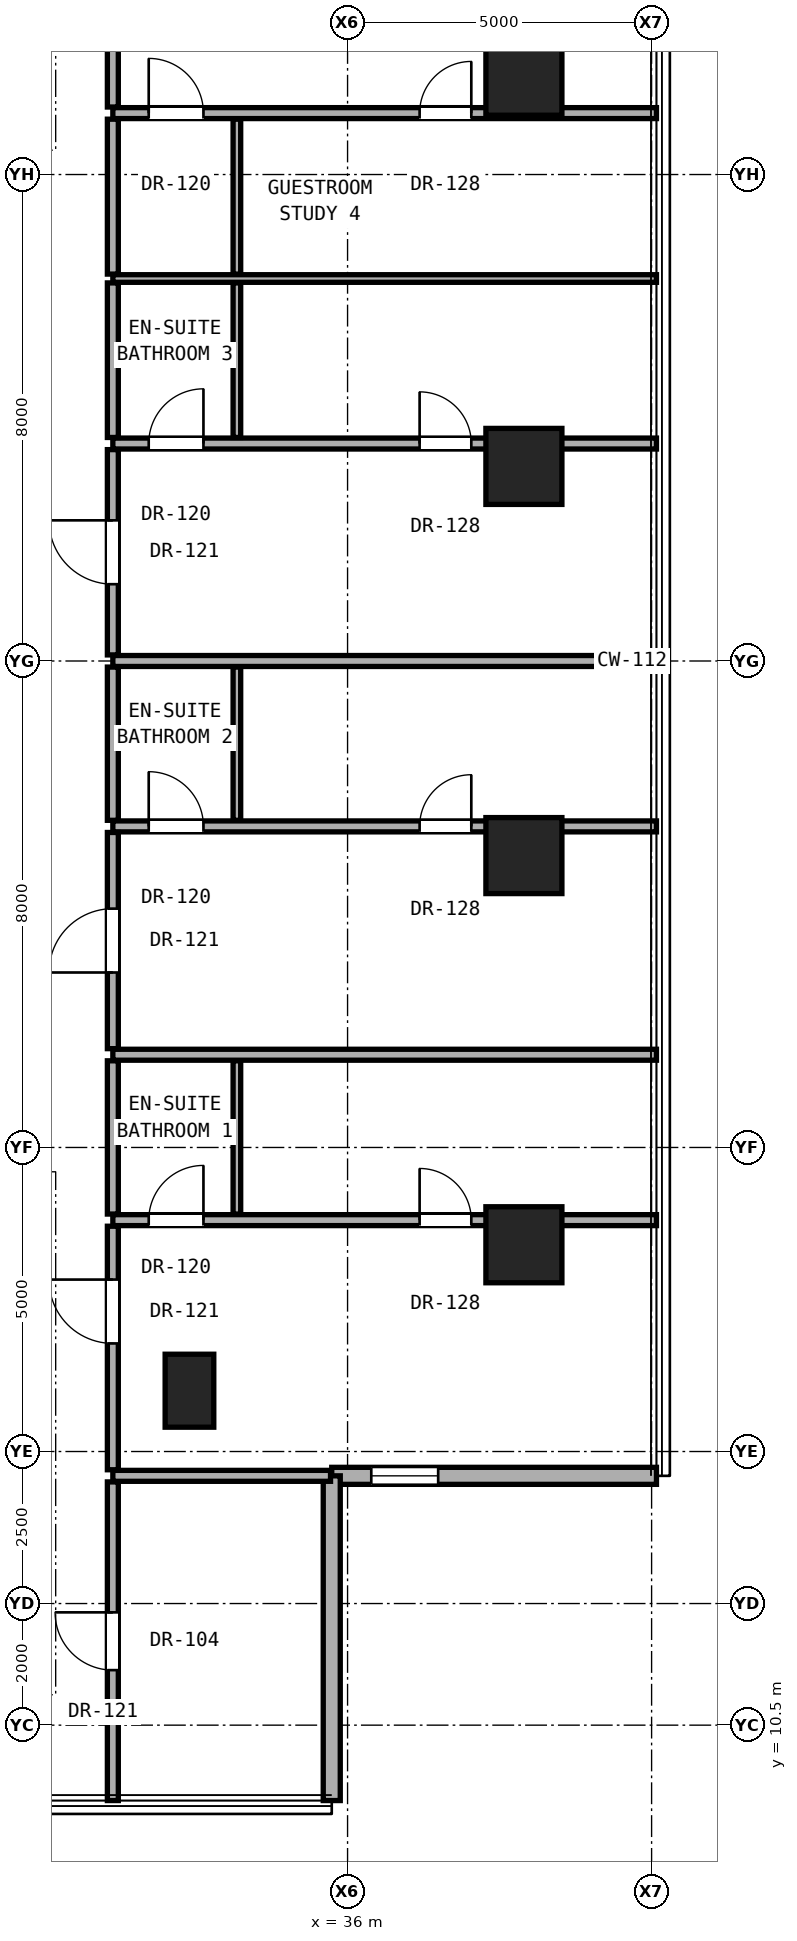
"""IFC4 building model, lengths in metres.
Left out: names, types, materials, properties, quantities, classifications, styles, units other than length and angle.
Written with IfcOpenShell. Run it as: python <this file> out.ifc"""

import sys

from ifc_helpers import new_model, si_unit, direction, frame, frame_2d, origin, origin_2d, place, context, subcontext, project, spatial, rectangle, hollow_rectangle, extrude, element, fill, save


model = new_model("IFC4")
c1 = context("Model", 3, precision=1e-05, world=origin(), true_north=direction((0.0, 1.0)))
c2 = subcontext(c1, "Body", "Model", "MODEL_VIEW")
j1 = project(units=[si_unit("LENGTHUNIT", "METRE"), si_unit("PLANEANGLEUNIT", "RADIAN")], contexts=[c1])
p1 = place(None, origin())
s1 = spatial("IfcSite", under=j1, at=p1, CompositionType="ELEMENT")
p2 = place(p1, origin())
s2 = spatial("IfcBuilding", under=s1, at=p2, CompositionType="ELEMENT")
p3 = place(p2, frame((0.0, 0.0, 52.1)))
s3 = spatial("IfcBuildingStorey", under=s2, at=p3, CompositionType="ELEMENT", Elevation=52.1)
for number, where, z_axis, x_axis in (
    (1, (38.9, 18.4, 0.0), (0.0, 0.0, 1.0), (1.0, 0.0, 0.0)),
    (2, (38.9, 24.8, 0.0), (0.0, 0.0, 1.0), (1.0, 0.0, 0.0)),
    (3, (38.9, 31.2, 0.0), (0.0, 0.0, 1.0), (1.0, 0.0, 0.0)),
    (4, (38.9, 37.6, 0.0), (0.0, 0.0, 1.0), (1.0, 0.0, 0.0)),
):
    element("IfcColumn", number, at=place(p3, frame(where, z_axis=z_axis, x_axis=x_axis)), inside=s3, PredefinedType="COLUMN", context=c2, shape_type="SweptSolid", body=[
        extrude(hollow_rectangle(XDim=1.25, YDim=1.25, WallThickness=0.07, at=origin_2d()), origin(), (0.0, 0.0, 1.0), 3.3),
    ])
p4 = place(p3, frame((33.4, 16.0, 0.0), z_axis=(0.0, 0.0, 1.0), x_axis=(1.0, 0.0, 0.0)))
e5 = element("IfcColumn", 5, at=p4, inside=s3, PredefinedType="PILASTER", context=c2, shape_type="SweptSolid", body=[
    extrude(rectangle(XDim=0.8, YDim=1.2, at=origin_2d()), origin(), (0.0, 0.0, 1.0), 3.3),
])
p5 = place(p3, frame((35.74, 14.6, 0.0), z_axis=(0.0, 0.0, 1.0), x_axis=(1.0, 0.0, 0.0)))
e6 = element("IfcWall", 6, at=p5, inside=s3, PredefinedType="SOLIDWALL", context=c2, shape_type="SweptSolid", body=[
    extrude(rectangle(XDim=5.34, YDim=0.28, at=frame_2d((2.67, 0.0))), origin(), (0.0, 0.0, 1.0), 3.04),
])
p6 = place(p5, frame((0.65, 0.0, 0.85)))
e7 = element("IfcOpeningElement", 7, at=p6, cuts=e6, PredefinedType="OPENING", context=c2, shape_type="SweptSolid", body=[
    extrude(rectangle(XDim=1.1, YDim=2.0, at=frame_2d((0.55, 1.0))), frame((0.0, 0.15, 0.0), z_axis=(0.0, -1.0, 0.0), x_axis=(1.0, 0.0, 0.0)), (0.0, 0.0, 1.0), 0.3),
])
p7 = place(p3, frame((35.74, 9.26, 0.0), z_axis=(0.0, 0.0, 1.0), x_axis=(0.0, 1.0, 0.0)))
e8 = element("IfcWall", 8, at=p7, inside=s3, PredefinedType="SOLIDWALL", context=c2, shape_type="SweptSolid", body=[
    extrude(rectangle(XDim=5.34, YDim=0.28, at=frame_2d((2.67, 0.0))), origin(), (0.0, 0.0, 1.0), 3.04),
])
p8 = place(p3, frame((32.14, 14.6, 0.0), z_axis=(0.0, 0.0, 1.0), x_axis=(1.0, 0.0, 0.0)))
e9 = element("IfcWall", 9, at=p8, inside=s3, PredefinedType="PARTITIONING", context=c2, shape_type="SweptSolid", body=[
    extrude(rectangle(XDim=3.58, YDim=0.18, at=frame_2d((1.79, 0.0))), origin(), (0.0, 0.0, 1.0), 3.06),
])
p9 = place(p3, frame((32.14, 18.805, 0.0), z_axis=(0.0, 0.0, 1.0), x_axis=(1.0, 0.0, 0.0)))
e10 = element("IfcWall", 10, at=p9, inside=s3, PredefinedType="PARTITIONING", context=c2, shape_type="SweptSolid", body=[
    extrude(rectangle(XDim=8.94, YDim=0.18, at=frame_2d((4.47, 0.0))), origin(), (0.0, 0.0, 1.0), 2.125),
])
p10 = place(p9, frame((5.045, 0.0, 0.0)))
e11 = element("IfcOpeningElement", 11, at=p10, cuts=e10, PredefinedType="OPENING", context=c2, shape_type="SweptSolid", body=[
    extrude(rectangle(XDim=0.85, YDim=2.01, at=frame_2d((0.425, 1.005))), frame((0.0, 0.1, 0.0), z_axis=(0.0, -1.0, 0.0), x_axis=(1.0, 0.0, 0.0)), (0.0, 0.0, 1.0), 0.2),
])
p11 = place(p9, frame((0.59, 0.0, 0.0)))
e12 = element("IfcOpeningElement", 12, at=p11, cuts=e10, PredefinedType="OPENING", context=c2, shape_type="SweptSolid", body=[
    extrude(rectangle(XDim=0.9, YDim=2.1, at=frame_2d((0.45, 1.05))), frame((0.0, 0.1, 0.0), z_axis=(0.0, -1.0, 0.0), x_axis=(1.0, 0.0, 0.0)), (0.0, 0.0, 1.0), 0.2),
])
p12 = place(p3, frame((32.14, 21.525, 0.0), z_axis=(0.0, 0.0, 1.0), x_axis=(1.0, 0.0, 0.0)))
e13 = element("IfcWall", 13, at=p12, inside=s3, PredefinedType="PARTITIONING", context=c2, shape_type="SweptSolid", body=[
    extrude(rectangle(XDim=8.94, YDim=0.18, at=frame_2d((4.47, 0.0))), origin(), (0.0, 0.0, 1.0), 2.125),
])
p13 = place(p3, frame((32.14, 25.28, 0.0), z_axis=(0.0, 0.0, 1.0), x_axis=(1.0, 0.0, 0.0)))
e14 = element("IfcWall", 14, at=p13, inside=s3, PredefinedType="PARTITIONING", context=c2, shape_type="SweptSolid", body=[
    extrude(rectangle(XDim=8.94, YDim=0.18, at=frame_2d((4.47, 0.0))), origin(), (0.0, 0.0, 1.0), 2.125),
])
p14 = place(p13, frame((5.045, 0.0, 0.0)))
e15 = element("IfcOpeningElement", 15, at=p14, cuts=e14, PredefinedType="OPENING", context=c2, shape_type="SweptSolid", body=[
    extrude(rectangle(XDim=0.85, YDim=2.01, at=frame_2d((0.425, 1.005))), frame((0.0, 0.1, 0.0), z_axis=(0.0, -1.0, 0.0), x_axis=(1.0, 0.0, 0.0)), (0.0, 0.0, 1.0), 0.2),
])
p15 = place(p13, frame((0.59, 0.0, 0.0)))
e16 = element("IfcOpeningElement", 16, at=p15, cuts=e14, PredefinedType="OPENING", context=c2, shape_type="SweptSolid", body=[
    extrude(rectangle(XDim=0.9, YDim=2.1, at=frame_2d((0.45, 1.05))), frame((0.0, 0.1, 0.0), z_axis=(0.0, -1.0, 0.0), x_axis=(1.0, 0.0, 0.0)), (0.0, 0.0, 1.0), 0.2),
])
p16 = place(p3, frame((32.14, 28.0, 0.0), z_axis=(0.0, 0.0, 1.0), x_axis=(1.0, 0.0, 0.0)))
e17 = element("IfcWall", 17, at=p16, inside=s3, PredefinedType="PARTITIONING", context=c2, shape_type="SweptSolid", body=[
    extrude(rectangle(XDim=8.94, YDim=0.18, at=frame_2d((4.47, 0.0))), origin(), (0.0, 0.0, 1.0), 2.125),
])
p17 = place(p3, frame((32.14, 31.576, 0.0), z_axis=(0.0, 0.0, 1.0), x_axis=(1.0, 0.0, 0.0)))
e18 = element("IfcWall", 18, at=p17, inside=s3, PredefinedType="PARTITIONING", context=c2, shape_type="SweptSolid", body=[
    extrude(rectangle(XDim=8.94, YDim=0.18, at=frame_2d((4.47, 0.0))), origin(), (0.0, 0.0, 1.0), 2.125),
])
p18 = place(p17, frame((5.045, 0.0, 0.0)))
e19 = element("IfcOpeningElement", 19, at=p18, cuts=e18, PredefinedType="OPENING", context=c2, shape_type="SweptSolid", body=[
    extrude(rectangle(XDim=0.85, YDim=2.01, at=frame_2d((0.425, 1.005))), frame((0.0, 0.1, 0.0), z_axis=(0.0, -1.0, 0.0), x_axis=(1.0, 0.0, 0.0)), (0.0, 0.0, 1.0), 0.2),
])
p19 = place(p17, frame((0.59, 0.0, 0.0)))
e20 = element("IfcOpeningElement", 20, at=p19, cuts=e18, PredefinedType="OPENING", context=c2, shape_type="SweptSolid", body=[
    extrude(rectangle(XDim=0.9, YDim=2.1, at=frame_2d((0.45, 1.05))), frame((0.0, 0.1, 0.0), z_axis=(0.0, -1.0, 0.0), x_axis=(1.0, 0.0, 0.0)), (0.0, 0.0, 1.0), 0.2),
])
p20 = place(p3, frame((32.14, 34.29, 0.0), z_axis=(0.0, 0.0, 1.0), x_axis=(1.0, 0.0, 0.0)))
e21 = element("IfcWall", 21, at=p20, inside=s3, PredefinedType="PARTITIONING", context=c2, shape_type="SweptSolid", body=[
    extrude(rectangle(XDim=8.94, YDim=0.125, at=frame_2d((4.47, 0.0))), origin(), (0.0, 0.0, 1.0), 2.125),
])
p21 = place(p3, frame((32.14, 37.01, 0.0), z_axis=(0.0, 0.0, 1.0), x_axis=(1.0, 0.0, 0.0)))
e22 = element("IfcWall", 22, at=p21, inside=s3, PredefinedType="PARTITIONING", context=c2, shape_type="SweptSolid", body=[
    extrude(rectangle(XDim=8.94, YDim=0.18, at=frame_2d((4.47, 0.0))), origin(), (0.0, 0.0, 1.0), 2.125),
])
p22 = place(p21, frame((5.045, 0.0, 0.0)))
e23 = element("IfcOpeningElement", 23, at=p22, cuts=e22, PredefinedType="OPENING", context=c2, shape_type="SweptSolid", body=[
    extrude(rectangle(XDim=0.85, YDim=2.01, at=frame_2d((0.425, 1.005))), frame((0.0, 0.1, 0.0), z_axis=(0.0, -1.0, 0.0), x_axis=(1.0, 0.0, 0.0)), (0.0, 0.0, 1.0), 0.2),
])
p23 = place(p21, frame((0.59, 0.0, 0.0)))
e24 = element("IfcOpeningElement", 24, at=p23, cuts=e22, PredefinedType="OPENING", context=c2, shape_type="SweptSolid", body=[
    extrude(rectangle(XDim=0.9, YDim=2.1, at=frame_2d((0.45, 1.05))), frame((0.0, 0.1, 0.0), z_axis=(0.0, -1.0, 0.0), x_axis=(1.0, 0.0, 0.0)), (0.0, 0.0, 1.0), 0.2),
])
p24 = place(p3, frame((32.14, 9.26, 0.0), z_axis=(0.0, 0.0, 1.0), x_axis=(0.0, 1.0, 0.0)))
e25 = element("IfcWall", 25, at=p24, inside=s3, PredefinedType="PARTITIONING", context=c2, shape_type="SweptSolid", body=[
    extrude(rectangle(XDim=5.24, YDim=0.18, at=frame_2d((2.62, 0.0))), origin(), (0.0, 0.0, 1.0), 3.06),
])
p25 = place(p24, frame((2.145, 0.0, 0.0)))
e26 = element("IfcOpeningElement", 26, at=p25, cuts=e25, PredefinedType="OPENING", context=c2, shape_type="SweptSolid", body=[
    extrude(rectangle(XDim=0.95, YDim=2.15, at=frame_2d((0.475, 1.075))), frame((0.0, 0.1, 0.0), z_axis=(0.0, -1.0, 0.0), x_axis=(1.0, 0.0, 0.0)), (0.0, 0.0, 1.0), 0.2),
])
p26 = place(p3, frame((32.14, 14.7, 0.0), z_axis=(0.0, 0.0, 1.0), x_axis=(0.0, 1.0, 0.0)))
e27 = element("IfcWall", 27, at=p26, inside=s3, PredefinedType="PARTITIONING", context=c2, shape_type="SweptSolid", body=[
    extrude(rectangle(XDim=4.005, YDim=0.18, at=frame_2d((2.002, 0.0))), origin(), (0.0, 0.0, 1.0), 2.436),
])
p27 = place(p26, frame((2.077, 0.0, 0.0)))
e28 = element("IfcOpeningElement", 28, at=p27, cuts=e27, PredefinedType="OPENING", context=c2, shape_type="SweptSolid", body=[
    extrude(rectangle(XDim=1.05, YDim=2.2, at=frame_2d((0.525, 1.1))), frame((0.0, 0.1, 0.0), z_axis=(0.0, -1.0, 0.0), x_axis=(1.0, 0.0, 0.0)), (0.0, 0.0, 1.0), 0.2),
])
p28 = place(p3, frame((32.14, 18.905, 0.0), z_axis=(0.0, 0.0, 1.0), x_axis=(0.0, 1.0, 0.0)))
e29 = element("IfcWall", 29, at=p28, inside=s3, PredefinedType="PARTITIONING", context=c2, shape_type="SweptSolid", body=[
    extrude(rectangle(XDim=2.52, YDim=0.18, at=frame_2d((1.26, 0.0))), origin(), (0.0, 0.0, 1.0), 3.06),
])
p29 = place(p3, frame((32.14, 21.625, 0.0), z_axis=(0.0, 0.0, 1.0), x_axis=(0.0, 1.0, 0.0)))
e30 = element("IfcWall", 30, at=p29, inside=s3, PredefinedType="PARTITIONING", context=c2, shape_type="SweptSolid", body=[
    extrude(rectangle(XDim=3.555, YDim=0.18, at=frame_2d((1.777, 0.0))), origin(), (0.0, 0.0, 1.0), 2.279),
])
p30 = place(p29, frame((1.252, 0.0, 0.0)))
e31 = element("IfcOpeningElement", 31, at=p30, cuts=e30, PredefinedType="OPENING", context=c2, shape_type="SweptSolid", body=[
    extrude(rectangle(XDim=1.05, YDim=2.2, at=frame_2d((0.525, 1.1))), frame((0.0, 0.1, 0.0), z_axis=(0.0, -1.0, 0.0), x_axis=(1.0, 0.0, 0.0)), (0.0, 0.0, 1.0), 0.2),
])
p31 = place(p3, frame((32.14, 25.38, 0.0), z_axis=(0.0, 0.0, 1.0), x_axis=(0.0, 1.0, 0.0)))
e32 = element("IfcWall", 32, at=p31, inside=s3, PredefinedType="PARTITIONING", context=c2, shape_type="SweptSolid", body=[
    extrude(rectangle(XDim=2.52, YDim=0.18, at=frame_2d((1.26, 0.0))), origin(), (0.0, 0.0, 1.0), 3.06),
])
p32 = place(p3, frame((32.14, 28.1, 0.0), z_axis=(0.0, 0.0, 1.0), x_axis=(0.0, 1.0, 0.0)))
e33 = element("IfcWall", 33, at=p32, inside=s3, PredefinedType="PARTITIONING", context=c2, shape_type="SweptSolid", body=[
    extrude(rectangle(XDim=3.376, YDim=0.18, at=frame_2d((1.688, 0.0))), origin(), (0.0, 0.0, 1.0), 2.279),
])
p33 = place(p32, frame((1.163, 0.0, 0.0)))
e34 = element("IfcOpeningElement", 34, at=p33, cuts=e33, PredefinedType="OPENING", context=c2, shape_type="SweptSolid", body=[
    extrude(rectangle(XDim=1.05, YDim=2.2, at=frame_2d((0.525, 1.1))), frame((0.0, 0.1, 0.0), z_axis=(0.0, -1.0, 0.0), x_axis=(1.0, 0.0, 0.0)), (0.0, 0.0, 1.0), 0.2),
])
p34 = place(p3, frame((32.14, 31.676, 0.0), z_axis=(0.0, 0.0, 1.0), x_axis=(0.0, 1.0, 0.0)))
e35 = element("IfcWall", 35, at=p34, inside=s3, PredefinedType="PARTITIONING", context=c2, shape_type="SweptSolid", body=[
    extrude(rectangle(XDim=2.542, YDim=0.18, at=frame_2d((1.271, 0.0))), origin(), (0.0, 0.0, 1.0), 3.06),
])
p35 = place(p3, frame((32.14, 34.363, 0.0), z_axis=(0.0, 0.0, 1.0), x_axis=(0.0, 1.0, 0.0)))
e36 = element("IfcWall", 36, at=p35, inside=s3, PredefinedType="PARTITIONING", context=c2, shape_type="SweptSolid", body=[
    extrude(rectangle(XDim=2.547, YDim=0.18, at=frame_2d((1.274, 0.0))), origin(), (0.0, 0.0, 1.0), 3.06),
])
p36 = place(p3, frame((32.14, 37.11, 0.0), z_axis=(0.0, 0.0, 1.0), x_axis=(0.0, 1.0, 0.0)))
e37 = element("IfcWall", 37, at=p36, inside=s3, PredefinedType="PARTITIONING", context=c2, shape_type="SweptSolid", body=[
    extrude(rectangle(XDim=4.19, YDim=0.18, at=frame_2d((2.095, 0.0))), origin(), (0.0, 0.0, 1.0), 2.436),
])
p37 = place(p36, frame((0.97, 0.0, 0.0)))
e38 = element("IfcOpeningElement", 38, at=p37, cuts=e37, PredefinedType="OPENING", context=c2, shape_type="SweptSolid", body=[
    extrude(rectangle(XDim=1.05, YDim=2.2, at=frame_2d((0.525, 1.1))), frame((0.0, 0.1, 0.0), z_axis=(0.0, -1.0, 0.0), x_axis=(1.0, 0.0, 0.0)), (0.0, 0.0, 1.0), 0.2),
])
for number, where, z_axis, x_axis in (
    (39, (34.18, 18.905, 0.0), (0.0, 0.0, 1.0), (0.0, 1.0, 0.0)),
    (40, (34.18, 25.38, 0.0), (0.0, 0.0, 1.0), (0.0, 1.0, 0.0)),
):
    element("IfcWall", number, at=place(p3, frame(where, z_axis=z_axis, x_axis=x_axis)), inside=s3, PredefinedType="PARTITIONING", context=c2, shape_type="SweptSolid", body=[
        extrude(rectangle(XDim=2.52, YDim=0.125, at=frame_2d((1.26, 0.0))), origin(), (0.0, 0.0, 1.0), 3.06),
    ])
p38 = place(p3, frame((34.18, 31.676, 0.0), z_axis=(0.0, 0.0, 1.0), x_axis=(0.0, 1.0, 0.0)))
e41 = element("IfcWall", 41, at=p38, inside=s3, PredefinedType="PARTITIONING", context=c2, shape_type="SweptSolid", body=[
    extrude(rectangle(XDim=2.542, YDim=0.125, at=frame_2d((1.271, 0.0))), origin(), (0.0, 0.0, 1.0), 3.06),
])
p39 = place(p3, frame((34.18, 34.363, 0.0), z_axis=(0.0, 0.0, 1.0), x_axis=(0.0, 1.0, 0.0)))
e42 = element("IfcWall", 42, at=p39, inside=s3, PredefinedType="PARTITIONING", context=c2, shape_type="SweptSolid", body=[
    extrude(rectangle(XDim=2.547, YDim=0.125, at=frame_2d((1.274, 0.0))), origin(), (0.0, 0.0, 1.0), 3.06),
])
p40 = place(p6, origin())
e43 = element("IfcWindow", 43, at=p40, inside=s3, PartitioningType="SINGLE_PANEL", PredefinedType="WINDOW", context=c2, shape_type="SweptSolid", body=[
    extrude(rectangle(XDim=1.1, YDim=2.0, at=frame_2d((0.55, 1.0))), frame((0.0, 0.03, 0.0), z_axis=(0.0, -1.0, 0.0), x_axis=(1.0, 0.0, 0.0)), (0.0, 0.0, 1.0), 0.06),
])
fill(e7, e43)
p41 = place(p27, origin())
e44 = element("IfcDoor", 44, at=p41, inside=s3, OperationType="SINGLE_SWING_RIGHT", PredefinedType="DOOR", context=c2, shape_type="SweptSolid", body=[
    extrude(rectangle(XDim=1.05, YDim=2.2, at=frame_2d((0.525, 1.1))), frame((0.0, 0.025, 0.0), z_axis=(0.0, -1.0, 0.0), x_axis=(1.0, 0.0, 0.0)), (0.0, 0.0, 1.0), 0.05),
])
fill(e28, e44)
p42 = place(p10, origin())
e45 = element("IfcDoor", 45, at=p42, inside=s3, OperationType="SINGLE_SWING_LEFT", PredefinedType="DOOR", context=c2, shape_type="SweptSolid", body=[
    extrude(rectangle(XDim=0.85, YDim=2.01, at=frame_2d((0.425, 1.005))), frame((0.0, 0.025, 0.0), z_axis=(0.0, -1.0, 0.0), x_axis=(1.0, 0.0, 0.0)), (0.0, 0.0, 1.0), 0.05),
])
fill(e11, e45)
p43 = place(p11, origin())
e46 = element("IfcDoor", 46, at=p43, inside=s3, OperationType="SINGLE_SWING_RIGHT", PredefinedType="DOOR", context=c2, shape_type="SweptSolid", body=[
    extrude(rectangle(XDim=0.9, YDim=2.1, at=frame_2d((0.45, 1.05))), frame((0.0, 0.025, 0.0), z_axis=(0.0, -1.0, 0.0), x_axis=(1.0, 0.0, 0.0)), (0.0, 0.0, 1.0), 0.05),
])
fill(e12, e46)
p44 = place(p30, origin())
e47 = element("IfcDoor", 47, at=p44, inside=s3, OperationType="SINGLE_SWING_LEFT", PredefinedType="DOOR", context=c2, shape_type="SweptSolid", body=[
    extrude(rectangle(XDim=1.05, YDim=2.2, at=frame_2d((0.525, 1.1))), frame((0.0, 0.025, 0.0), z_axis=(0.0, -1.0, 0.0), x_axis=(1.0, 0.0, 0.0)), (0.0, 0.0, 1.0), 0.05),
])
fill(e31, e47)
p45 = place(p14, origin())
e48 = element("IfcDoor", 48, at=p45, inside=s3, OperationType="SINGLE_SWING_RIGHT", PredefinedType="DOOR", context=c2, shape_type="SweptSolid", body=[
    extrude(rectangle(XDim=0.85, YDim=2.01, at=frame_2d((0.425, 1.005))), frame((0.0, 0.025, 0.0), z_axis=(0.0, -1.0, 0.0), x_axis=(1.0, 0.0, 0.0)), (0.0, 0.0, 1.0), 0.05),
])
fill(e15, e48)
p46 = place(p15, origin())
e49 = element("IfcDoor", 49, at=p46, inside=s3, OperationType="SINGLE_SWING_LEFT", PredefinedType="DOOR", context=c2, shape_type="SweptSolid", body=[
    extrude(rectangle(XDim=0.9, YDim=2.1, at=frame_2d((0.45, 1.05))), frame((0.0, 0.025, 0.0), z_axis=(0.0, -1.0, 0.0), x_axis=(1.0, 0.0, 0.0)), (0.0, 0.0, 1.0), 0.05),
])
fill(e16, e49)
p47 = place(p33, origin())
e50 = element("IfcDoor", 50, at=p47, inside=s3, OperationType="SINGLE_SWING_RIGHT", PredefinedType="DOOR", context=c2, shape_type="SweptSolid", body=[
    extrude(rectangle(XDim=1.05, YDim=2.2, at=frame_2d((0.525, 1.1))), frame((0.0, 0.025, 0.0), z_axis=(0.0, -1.0, 0.0), x_axis=(1.0, 0.0, 0.0)), (0.0, 0.0, 1.0), 0.05),
])
fill(e34, e50)
p48 = place(p18, origin())
e51 = element("IfcDoor", 51, at=p48, inside=s3, OperationType="SINGLE_SWING_LEFT", PredefinedType="DOOR", context=c2, shape_type="SweptSolid", body=[
    extrude(rectangle(XDim=0.85, YDim=2.01, at=frame_2d((0.425, 1.005))), frame((0.0, 0.025, 0.0), z_axis=(0.0, -1.0, 0.0), x_axis=(1.0, 0.0, 0.0)), (0.0, 0.0, 1.0), 0.05),
])
fill(e19, e51)
p49 = place(p19, origin())
e52 = element("IfcDoor", 52, at=p49, inside=s3, OperationType="SINGLE_SWING_RIGHT", PredefinedType="DOOR", context=c2, shape_type="SweptSolid", body=[
    extrude(rectangle(XDim=0.9, YDim=2.1, at=frame_2d((0.45, 1.05))), frame((0.0, 0.025, 0.0), z_axis=(0.0, -1.0, 0.0), x_axis=(1.0, 0.0, 0.0)), (0.0, 0.0, 1.0), 0.05),
])
fill(e20, e52)
p50 = place(p22, origin())
e53 = element("IfcDoor", 53, at=p50, inside=s3, OperationType="SINGLE_SWING_RIGHT", PredefinedType="DOOR", context=c2, shape_type="SweptSolid", body=[
    extrude(rectangle(XDim=0.85, YDim=2.01, at=frame_2d((0.425, 1.005))), frame((0.0, 0.025, 0.0), z_axis=(0.0, -1.0, 0.0), x_axis=(1.0, 0.0, 0.0)), (0.0, 0.0, 1.0), 0.05),
])
fill(e23, e53)
p51 = place(p23, origin())
e54 = element("IfcDoor", 54, at=p51, inside=s3, OperationType="SINGLE_SWING_LEFT", PredefinedType="DOOR", context=c2, shape_type="SweptSolid", body=[
    extrude(rectangle(XDim=0.9, YDim=2.1, at=frame_2d((0.45, 1.05))), frame((0.0, 0.025, 0.0), z_axis=(0.0, -1.0, 0.0), x_axis=(1.0, 0.0, 0.0)), (0.0, 0.0, 1.0), 0.05),
])
fill(e24, e54)
p52 = place(p25, origin())
e55 = element("IfcDoor", 55, at=p52, inside=s3, OperationType="SINGLE_SWING_RIGHT", PredefinedType="DOOR", context=c2, shape_type="SweptSolid", body=[
    extrude(rectangle(XDim=0.95, YDim=2.15, at=frame_2d((0.475, 1.075))), frame((0.0, 0.025, 0.0), z_axis=(0.0, -1.0, 0.0), x_axis=(1.0, 0.0, 0.0)), (0.0, 0.0, 1.0), 0.05),
])
fill(e26, e55)
save(model, sys.argv[1])
